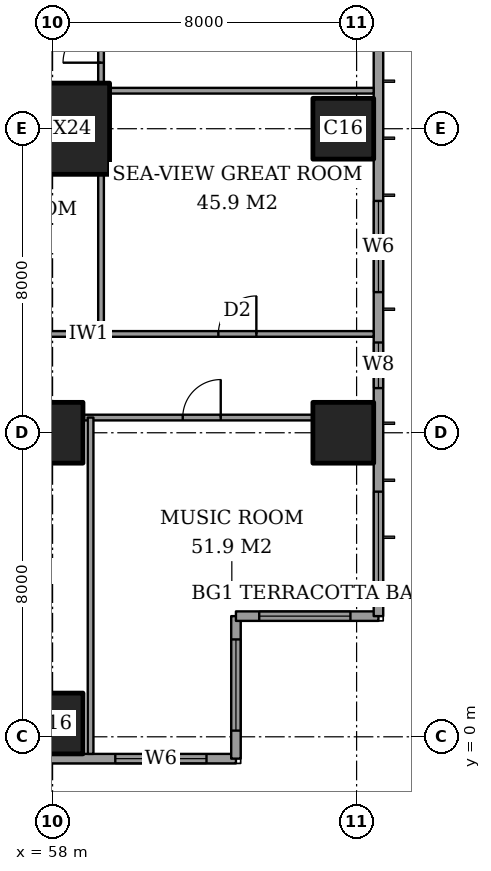
"""IFC4 building model, lengths in metres.
Left out: names, types, materials, properties, quantities, classifications, styles, units other than length and angle.
Written with IfcOpenShell. Run it as: python <this file> out.ifc"""

import sys

from ifc_helpers import new_model, si_unit, direction, frame, frame_2d, origin, origin_2d, place, context, subcontext, project, spatial, rectangle, extrude, element, fill, save


model = new_model("IFC4")
c1 = context("Model", 3, precision=1e-05, world=origin(), true_north=direction((0.0, 1.0)))
c2 = subcontext(c1, "Body", "Model", "MODEL_VIEW")
j1 = project(units=[si_unit("LENGTHUNIT", "METRE"), si_unit("PLANEANGLEUNIT", "RADIAN")], contexts=[c1])
p1 = place(None, origin())
s1 = spatial("IfcSite", under=j1, at=p1, CompositionType="ELEMENT")
p2 = place(p1, origin())
s2 = spatial("IfcBuilding", under=s1, at=p2, CompositionType="ELEMENT")
p3 = place(p2, frame((0.0, 0.0, 248.4)))
s3 = spatial("IfcBuildingStorey", under=s2, at=p3, CompositionType="ELEMENT", Elevation=248.4)
for number, where, z_axis, x_axis in (
    (1, (58.0, 0.35, 0.0), (0.0, 0.0, 1.0), (1.0, 0.0, 0.0)),
    (2, (58.0, 8.0, 0.0), (0.0, 0.0, 1.0), (1.0, 0.0, 0.0)),
):
    element("IfcColumn", number, at=place(p3, frame(where, z_axis=z_axis, x_axis=x_axis)), inside=s3, PredefinedType="COLUMN", context=c2, shape_type="SweptSolid", body=[
        extrude(rectangle(XDim=1.6, YDim=1.6, at=origin_2d()), origin(), (0.0, 0.0, 1.0), 3.6),
    ])
p4 = place(p3, frame((58.0, 16.0, 0.0), z_axis=(0.0, 0.0, 1.0), x_axis=(1.0, 0.0, 0.0)))
e3 = element("IfcColumn", 3, at=p4, inside=s3, PredefinedType="COLUMN", context=c2, shape_type="SweptSolid", body=[
    extrude(rectangle(XDim=3.0, YDim=2.4, at=origin_2d()), origin(), (0.0, 0.0, 1.0), 3.6),
])
for number, where, z_axis, x_axis in (
    (4, (65.65, 8.0, 0.0), (0.0, 0.0, 1.0), (1.0, 0.0, 0.0)),
    (5, (65.65, 16.0, 0.0), (0.0, 0.0, 1.0), (1.0, 0.0, 0.0)),
):
    element("IfcColumn", number, at=place(p3, frame(where, z_axis=z_axis, x_axis=x_axis)), inside=s3, PredefinedType="COLUMN", context=c2, shape_type="SweptSolid", body=[
        extrude(rectangle(XDim=1.6, YDim=1.6, at=origin_2d()), origin(), (0.0, 0.0, 1.0), 3.6),
    ])
p5 = place(p3, frame((41.425, -0.575, 0.0), z_axis=(0.0, 0.0, 1.0), x_axis=(1.0, 0.0, 0.0)))
e6 = element("IfcWall", 6, at=p5, inside=s3, PredefinedType="SOLIDWALL", context=c2, shape_type="SweptSolid", body=[
    extrude(rectangle(XDim=21.4, YDim=0.25, at=frame_2d((10.7, 0.0))), origin(), (0.0, 0.0, 1.0), 3.6),
])
p6 = place(p5, frame((3.05, 0.0, 0.6)))
e7 = element("IfcOpeningElement", 7, at=p6, cuts=e6, PredefinedType="OPENING", context=c2, shape_type="SweptSolid", body=[
    extrude(rectangle(XDim=2.4, YDim=2.0, at=frame_2d((1.2, 1.0))), frame((0.0, 0.135, 0.0), z_axis=(0.0, -1.0, 0.0), x_axis=(1.0, 0.0, 0.0)), (0.0, 0.0, 1.0), 0.27),
])
p7 = place(p5, frame((6.95, 0.0, 0.6)))
e8 = element("IfcOpeningElement", 8, at=p7, cuts=e6, PredefinedType="OPENING", context=c2, shape_type="SweptSolid", body=[
    extrude(rectangle(XDim=0.6, YDim=2.0, at=frame_2d((0.3, 1.0))), frame((0.0, 0.135, 0.0), z_axis=(0.0, -1.0, 0.0), x_axis=(1.0, 0.0, 0.0)), (0.0, 0.0, 1.0), 0.27),
])
p8 = place(p5, frame((9.875, 0.0, 0.6)))
e9 = element("IfcOpeningElement", 9, at=p8, cuts=e6, PredefinedType="OPENING", context=c2, shape_type="SweptSolid", body=[
    extrude(rectangle(XDim=1.2, YDim=2.0, at=frame_2d((0.6, 1.0))), frame((0.0, 0.135, 0.0), z_axis=(0.0, -1.0, 0.0), x_axis=(1.0, 0.0, 0.0)), (0.0, 0.0, 1.0), 0.27),
])
p9 = place(p5, frame((12.475, 0.0, 0.6)))
e10 = element("IfcOpeningElement", 10, at=p9, cuts=e6, PredefinedType="OPENING", context=c2, shape_type="SweptSolid", body=[
    extrude(rectangle(XDim=2.4, YDim=2.0, at=frame_2d((1.2, 1.0))), frame((0.0, 0.135, 0.0), z_axis=(0.0, -1.0, 0.0), x_axis=(1.0, 0.0, 0.0)), (0.0, 0.0, 1.0), 0.27),
])
p10 = place(p5, frame((18.225, 0.0, 0.6)))
e11 = element("IfcOpeningElement", 11, at=p10, cuts=e6, PredefinedType="OPENING", context=c2, shape_type="SweptSolid", body=[
    extrude(rectangle(XDim=2.4, YDim=2.0, at=frame_2d((1.2, 1.0))), frame((0.0, 0.135, 0.0), z_axis=(0.0, -1.0, 0.0), x_axis=(1.0, 0.0, 0.0)), (0.0, 0.0, 1.0), 0.27),
])
p11 = place(p3, frame((62.825, -0.575, 0.0), z_axis=(0.0, 0.0, 1.0), x_axis=(0.0, 1.0, 0.0)))
e12 = element("IfcWall", 12, at=p11, inside=s3, PredefinedType="SOLIDWALL", context=c2, shape_type="SweptSolid", body=[
    extrude(rectangle(XDim=3.75, YDim=0.25, at=frame_2d((1.875, 0.0))), origin(), (0.0, 0.0, 1.0), 3.6),
])
p12 = place(p11, frame((0.738, 0.0, 0.6)))
e13 = element("IfcOpeningElement", 13, at=p12, cuts=e12, PredefinedType="OPENING", context=c2, shape_type="SweptSolid", body=[
    extrude(rectangle(XDim=2.4, YDim=2.0, at=frame_2d((1.2, 1.0))), frame((0.0, 0.135, 0.0), z_axis=(0.0, -1.0, 0.0), x_axis=(1.0, 0.0, 0.0)), (0.0, 0.0, 1.0), 0.27),
])
p13 = place(p3, frame((62.825, 3.175, 0.0), z_axis=(0.0, 0.0, 1.0), x_axis=(1.0, 0.0, 0.0)))
e14 = element("IfcWall", 14, at=p13, inside=s3, PredefinedType="SOLIDWALL", context=c2, shape_type="SweptSolid", body=[
    extrude(rectangle(XDim=3.75, YDim=0.25, at=frame_2d((1.875, 0.0))), origin(), (0.0, 0.0, 1.0), 3.6),
])
p14 = place(p13, frame((0.613, 0.0, 0.6)))
e15 = element("IfcOpeningElement", 15, at=p14, cuts=e14, PredefinedType="OPENING", context=c2, shape_type="SweptSolid", body=[
    extrude(rectangle(XDim=2.4, YDim=2.0, at=frame_2d((1.2, 1.0))), frame((0.0, 0.135, 0.0), z_axis=(0.0, -1.0, 0.0), x_axis=(1.0, 0.0, 0.0)), (0.0, 0.0, 1.0), 0.27),
])
p15 = place(p3, frame((66.575, 3.175, 0.0), z_axis=(0.0, 0.0, 1.0), x_axis=(0.0, 1.0, 0.0)))
e16 = element("IfcWall", 16, at=p15, inside=s3, PredefinedType="SOLIDWALL", context=c2, shape_type="SweptSolid", body=[
    extrude(rectangle(XDim=41.65, YDim=0.25, at=frame_2d((20.825, 0.0))), origin(), (0.0, 0.0, 1.0), 3.6),
])
p16 = place(p15, frame((0.875, 0.0, 0.6)))
e17 = element("IfcOpeningElement", 17, at=p16, cuts=e16, PredefinedType="OPENING", context=c2, shape_type="SweptSolid", body=[
    extrude(rectangle(XDim=2.4, YDim=2.0, at=frame_2d((1.2, 1.0))), frame((0.0, 0.135, 0.0), z_axis=(0.0, -1.0, 0.0), x_axis=(1.0, 0.0, 0.0)), (0.0, 0.0, 1.0), 0.27),
])
p17 = place(p15, frame((6.0, 0.0, 0.6)))
e18 = element("IfcOpeningElement", 18, at=p17, cuts=e16, PredefinedType="OPENING", context=c2, shape_type="SweptSolid", body=[
    extrude(rectangle(XDim=1.2, YDim=2.0, at=frame_2d((0.6, 1.0))), frame((0.0, 0.135, 0.0), z_axis=(0.0, -1.0, 0.0), x_axis=(1.0, 0.0, 0.0)), (0.0, 0.0, 1.0), 0.27),
])
p18 = place(p15, frame((8.525, 0.0, 0.6)))
e19 = element("IfcOpeningElement", 19, at=p18, cuts=e16, PredefinedType="OPENING", context=c2, shape_type="SweptSolid", body=[
    extrude(rectangle(XDim=2.4, YDim=2.0, at=frame_2d((1.2, 1.0))), frame((0.0, 0.135, 0.0), z_axis=(0.0, -1.0, 0.0), x_axis=(1.0, 0.0, 0.0)), (0.0, 0.0, 1.0), 0.27),
])
p19 = place(p15, frame((15.725, 0.0, 0.6)))
e20 = element("IfcOpeningElement", 20, at=p19, cuts=e16, PredefinedType="OPENING", context=c2, shape_type="SweptSolid", body=[
    extrude(rectangle(XDim=2.4, YDim=2.0, at=frame_2d((1.2, 1.0))), frame((0.0, 0.135, 0.0), z_axis=(0.0, -1.0, 0.0), x_axis=(1.0, 0.0, 0.0)), (0.0, 0.0, 1.0), 0.27),
])
p20 = place(p15, frame((23.525, 0.0, 0.6)))
e21 = element("IfcOpeningElement", 21, at=p20, cuts=e16, PredefinedType="OPENING", context=c2, shape_type="SweptSolid", body=[
    extrude(rectangle(XDim=2.4, YDim=2.0, at=frame_2d((1.2, 1.0))), frame((0.0, 0.135, 0.0), z_axis=(0.0, -1.0, 0.0), x_axis=(1.0, 0.0, 0.0)), (0.0, 0.0, 1.0), 0.27),
])
p21 = place(p15, frame((30.625, 0.0, 0.6)))
e22 = element("IfcOpeningElement", 22, at=p21, cuts=e16, PredefinedType="OPENING", context=c2, shape_type="SweptSolid", body=[
    extrude(rectangle(XDim=2.4, YDim=2.0, at=frame_2d((1.2, 1.0))), frame((0.0, 0.135, 0.0), z_axis=(0.0, -1.0, 0.0), x_axis=(1.0, 0.0, 0.0)), (0.0, 0.0, 1.0), 0.27),
])
p22 = place(p15, frame((34.325, 0.0, 0.6)))
e23 = element("IfcOpeningElement", 23, at=p22, cuts=e16, PredefinedType="OPENING", context=c2, shape_type="SweptSolid", body=[
    extrude(rectangle(XDim=1.2, YDim=2.0, at=frame_2d((0.6, 1.0))), frame((0.0, 0.135, 0.0), z_axis=(0.0, -1.0, 0.0), x_axis=(1.0, 0.0, 0.0)), (0.0, 0.0, 1.0), 0.27),
])
p23 = place(p15, frame((38.375, 0.0, 0.6)))
e24 = element("IfcOpeningElement", 24, at=p23, cuts=e16, PredefinedType="OPENING", context=c2, shape_type="SweptSolid", body=[
    extrude(rectangle(XDim=2.4, YDim=2.0, at=frame_2d((1.2, 1.0))), frame((0.0, 0.135, 0.0), z_axis=(0.0, -1.0, 0.0), x_axis=(1.0, 0.0, 0.0)), (0.0, 0.0, 1.0), 0.27),
])
p24 = place(p3, frame((58.8, 8.4, 0.0), z_axis=(0.0, 0.0, 1.0), x_axis=(1.0, 0.0, 0.0)))
e25 = element("IfcWall", 25, at=p24, inside=s3, PredefinedType="PARTITIONING", context=c2, shape_type="SweptSolid", body=[
    extrude(rectangle(XDim=6.05, YDim=0.15, at=frame_2d((3.025, 0.0))), origin(), (0.0, 0.0, 1.0), 3.35),
])
p25 = place(p24, frame((2.625, 0.0, 0.0)))
e26 = element("IfcOpeningElement", 26, at=p25, cuts=e25, PredefinedType="OPENING", context=c2, shape_type="SweptSolid", body=[
    extrude(rectangle(XDim=1.0, YDim=2.1, at=frame_2d((0.5, 1.05))), frame((0.0, 0.085, 0.0), z_axis=(0.0, -1.0, 0.0), x_axis=(1.0, 0.0, 0.0)), (0.0, 0.0, 1.0), 0.17),
])
p26 = place(p3, frame((41.439, 10.6, 0.0), z_axis=(0.0, 0.0, 1.0), x_axis=(1.0, 0.0, 0.0)))
e27 = element("IfcWall", 27, at=p26, inside=s3, PredefinedType="PARTITIONING", context=c2, shape_type="SweptSolid", body=[
    extrude(rectangle(XDim=25.011, YDim=0.15, at=frame_2d((12.505, 0.0))), origin(), (0.0, 0.0, 1.0), 3.35),
])
p27 = place(p26, frame((11.961, 0.0, 0.0)))
e28 = element("IfcOpeningElement", 28, at=p27, cuts=e27, PredefinedType="OPENING", context=c2, shape_type="SweptSolid", body=[
    extrude(rectangle(XDim=1.0, YDim=2.1, at=frame_2d((0.5, 1.05))), frame((0.0, 0.085, 0.0), z_axis=(0.0, -1.0, 0.0), x_axis=(1.0, 0.0, 0.0)), (0.0, 0.0, 1.0), 0.17),
])
p28 = place(p26, frame((20.924, 0.0, 0.0)))
e29 = element("IfcOpeningElement", 29, at=p28, cuts=e27, PredefinedType="OPENING", context=c2, shape_type="SweptSolid", body=[
    extrude(rectangle(XDim=1.0, YDim=2.1, at=frame_2d((0.5, 1.05))), frame((0.0, 0.085, 0.0), z_axis=(0.0, -1.0, 0.0), x_axis=(1.0, 0.0, 0.0)), (0.0, 0.0, 1.0), 0.17),
])
p29 = place(p26, frame((15.249, 0.0, 0.0)))
e30 = element("IfcOpeningElement", 30, at=p29, cuts=e27, PredefinedType="OPENING", context=c2, shape_type="SweptSolid", body=[
    extrude(rectangle(XDim=0.9, YDim=2.1, at=frame_2d((0.45, 1.05))), frame((0.0, 0.085, 0.0), z_axis=(0.0, -1.0, 0.0), x_axis=(1.0, 0.0, 0.0)), (0.0, 0.0, 1.0), 0.17),
])
p30 = place(p26, frame((9.661, 0.0, 0.0)))
e31 = element("IfcOpeningElement", 31, at=p30, cuts=e27, PredefinedType="OPENING", context=c2, shape_type="SweptSolid", body=[
    extrude(rectangle(XDim=1.0, YDim=2.1, at=frame_2d((0.5, 1.05))), frame((0.0, 0.085, 0.0), z_axis=(0.0, -1.0, 0.0), x_axis=(1.0, 0.0, 0.0)), (0.0, 0.0, 1.0), 0.17),
])
p31 = place(p26, frame((7.311, 0.0, 0.0)))
e32 = element("IfcOpeningElement", 32, at=p31, cuts=e27, PredefinedType="OPENING", context=c2, shape_type="SweptSolid", body=[
    extrude(rectangle(XDim=0.9, YDim=2.1, at=frame_2d((0.45, 1.05))), frame((0.0, 0.085, 0.0), z_axis=(0.0, -1.0, 0.0), x_axis=(1.0, 0.0, 0.0)), (0.0, 0.0, 1.0), 0.17),
])
p32 = place(p26, frame((2.836, 0.0, 0.0)))
e33 = element("IfcOpeningElement", 33, at=p32, cuts=e27, PredefinedType="OPENING", context=c2, shape_type="SweptSolid", body=[
    extrude(rectangle(XDim=1.0, YDim=2.1, at=frame_2d((0.5, 1.05))), frame((0.0, 0.085, 0.0), z_axis=(0.0, -1.0, 0.0), x_axis=(1.0, 0.0, 0.0)), (0.0, 0.0, 1.0), 0.17),
])
p33 = place(p3, frame((59.5, 17.0, 0.0), z_axis=(0.0, 0.0, 1.0), x_axis=(1.0, 0.0, 0.0)))
e34 = element("IfcWall", 34, at=p33, inside=s3, PredefinedType="PARTITIONING", context=c2, shape_type="SweptSolid", body=[
    extrude(rectangle(XDim=6.95, YDim=0.15, at=frame_2d((3.475, 0.0))), origin(), (0.0, 0.0, 1.0), 3.35),
])
p34 = place(p3, frame((59.0, -0.45, 0.0), z_axis=(0.0, 0.0, 1.0), x_axis=(0.0, 1.0, 0.0)))
e35 = element("IfcWall", 35, at=p34, inside=s3, PredefinedType="PARTITIONING", context=c2, shape_type="SweptSolid", body=[
    extrude(rectangle(XDim=8.85, YDim=0.15, at=frame_2d((4.425, 0.0))), origin(), (0.0, 0.0, 1.0), 3.35),
])
p35 = place(p3, frame((59.275, 10.6, 0.0), z_axis=(0.0, 0.0, 1.0), x_axis=(0.0, 1.0, 0.0)))
e36 = element("IfcWall", 36, at=p35, inside=s3, PredefinedType="PARTITIONING", context=c2, shape_type="SweptSolid", body=[
    extrude(rectangle(XDim=4.2, YDim=0.15, at=frame_2d((2.1, 0.0))), origin(), (0.0, 0.0, 1.0), 3.35),
])
p36 = place(p3, frame((59.275, 17.2, 0.0), z_axis=(0.0, 0.0, 1.0), x_axis=(0.0, 1.0, 0.0)))
e37 = element("IfcWall", 37, at=p36, inside=s3, PredefinedType="PARTITIONING", context=c2, shape_type="SweptSolid", body=[
    extrude(rectangle(XDim=2.45, YDim=0.15, at=frame_2d((1.225, 0.0))), origin(), (0.0, 0.0, 1.0), 3.35),
])
p37 = place(p36, frame((0.538, 0.0, 0.0)))
e38 = element("IfcOpeningElement", 38, at=p37, cuts=e37, PredefinedType="OPENING", context=c2, shape_type="SweptSolid", body=[
    extrude(rectangle(XDim=1.0, YDim=2.1, at=frame_2d((0.5, 1.05))), frame((0.0, 0.085, 0.0), z_axis=(0.0, -1.0, 0.0), x_axis=(1.0, 0.0, 0.0)), (0.0, 0.0, 1.0), 0.17),
])
p38 = place(p10, origin())
e39 = element("IfcWindow", 39, at=p38, inside=s3, PartitioningType="SINGLE_PANEL", PredefinedType="WINDOW", context=c2, shape_type="SweptSolid", body=[
    extrude(rectangle(XDim=2.4, YDim=2.0, at=frame_2d((1.2, 1.0))), frame((0.0, 0.03, 0.0), z_axis=(0.0, -1.0, 0.0), x_axis=(1.0, 0.0, 0.0)), (0.0, 0.0, 1.0), 0.06),
])
fill(e11, e39)
p39 = place(p12, origin())
e40 = element("IfcWindow", 40, at=p39, inside=s3, PartitioningType="SINGLE_PANEL", PredefinedType="WINDOW", context=c2, shape_type="SweptSolid", body=[
    extrude(rectangle(XDim=2.4, YDim=2.0, at=frame_2d((1.2, 1.0))), frame((0.0, 0.03, 0.0), z_axis=(0.0, -1.0, 0.0), x_axis=(1.0, 0.0, 0.0)), (0.0, 0.0, 1.0), 0.06),
])
fill(e13, e40)
p40 = place(p14, origin())
e41 = element("IfcWindow", 41, at=p40, inside=s3, PartitioningType="SINGLE_PANEL", PredefinedType="WINDOW", context=c2, shape_type="SweptSolid", body=[
    extrude(rectangle(XDim=2.4, YDim=2.0, at=frame_2d((1.2, 1.0))), frame((0.0, 0.03, 0.0), z_axis=(0.0, -1.0, 0.0), x_axis=(1.0, 0.0, 0.0)), (0.0, 0.0, 1.0), 0.06),
])
fill(e15, e41)
p41 = place(p16, origin())
e42 = element("IfcWindow", 42, at=p41, inside=s3, PartitioningType="SINGLE_PANEL", PredefinedType="WINDOW", context=c2, shape_type="SweptSolid", body=[
    extrude(rectangle(XDim=2.4, YDim=2.0, at=frame_2d((1.2, 1.0))), frame((0.0, 0.03, 0.0), z_axis=(0.0, -1.0, 0.0), x_axis=(1.0, 0.0, 0.0)), (0.0, 0.0, 1.0), 0.06),
])
fill(e17, e42)
p42 = place(p17, origin())
e43 = element("IfcWindow", 43, at=p42, inside=s3, PartitioningType="SINGLE_PANEL", PredefinedType="WINDOW", context=c2, shape_type="SweptSolid", body=[
    extrude(rectangle(XDim=1.2, YDim=2.0, at=frame_2d((0.6, 1.0))), frame((0.0, 0.03, 0.0), z_axis=(0.0, -1.0, 0.0), x_axis=(1.0, 0.0, 0.0)), (0.0, 0.0, 1.0), 0.06),
])
fill(e18, e43)
p43 = place(p18, origin())
e44 = element("IfcWindow", 44, at=p43, inside=s3, PartitioningType="SINGLE_PANEL", PredefinedType="WINDOW", context=c2, shape_type="SweptSolid", body=[
    extrude(rectangle(XDim=2.4, YDim=2.0, at=frame_2d((1.2, 1.0))), frame((0.0, 0.03, 0.0), z_axis=(0.0, -1.0, 0.0), x_axis=(1.0, 0.0, 0.0)), (0.0, 0.0, 1.0), 0.06),
])
fill(e19, e44)
p44 = place(p25, origin())
e45 = element("IfcDoor", 45, at=p44, inside=s3, OperationType="SINGLE_SWING_LEFT", PredefinedType="DOOR", context=c2, shape_type="SweptSolid", body=[
    extrude(rectangle(XDim=1.0, YDim=2.1, at=frame_2d((0.5, 1.05))), frame((0.0, 0.025, 0.0), z_axis=(0.0, -1.0, 0.0), x_axis=(1.0, 0.0, 0.0)), (0.0, 0.0, 1.0), 0.05),
])
fill(e26, e45)
p45 = place(p28, origin())
e46 = element("IfcDoor", 46, at=p45, inside=s3, OperationType="SINGLE_SWING_LEFT", PredefinedType="DOOR", context=c2, shape_type="SweptSolid", body=[
    extrude(rectangle(XDim=1.0, YDim=2.1, at=frame_2d((0.5, 1.05))), frame((0.0, 0.025, 0.0), z_axis=(0.0, -1.0, 0.0), x_axis=(1.0, 0.0, 0.0)), (0.0, 0.0, 1.0), 0.05),
])
fill(e29, e46)
p46 = place(p37, origin())
e47 = element("IfcDoor", 47, at=p46, inside=s3, OperationType="SINGLE_SWING_RIGHT", PredefinedType="DOOR", context=c2, shape_type="SweptSolid", body=[
    extrude(rectangle(XDim=1.0, YDim=2.1, at=frame_2d((0.5, 1.05))), frame((0.0, 0.025, 0.0), z_axis=(0.0, -1.0, 0.0), x_axis=(1.0, 0.0, 0.0)), (0.0, 0.0, 1.0), 0.05),
])
fill(e38, e47)
save(model, sys.argv[1])
